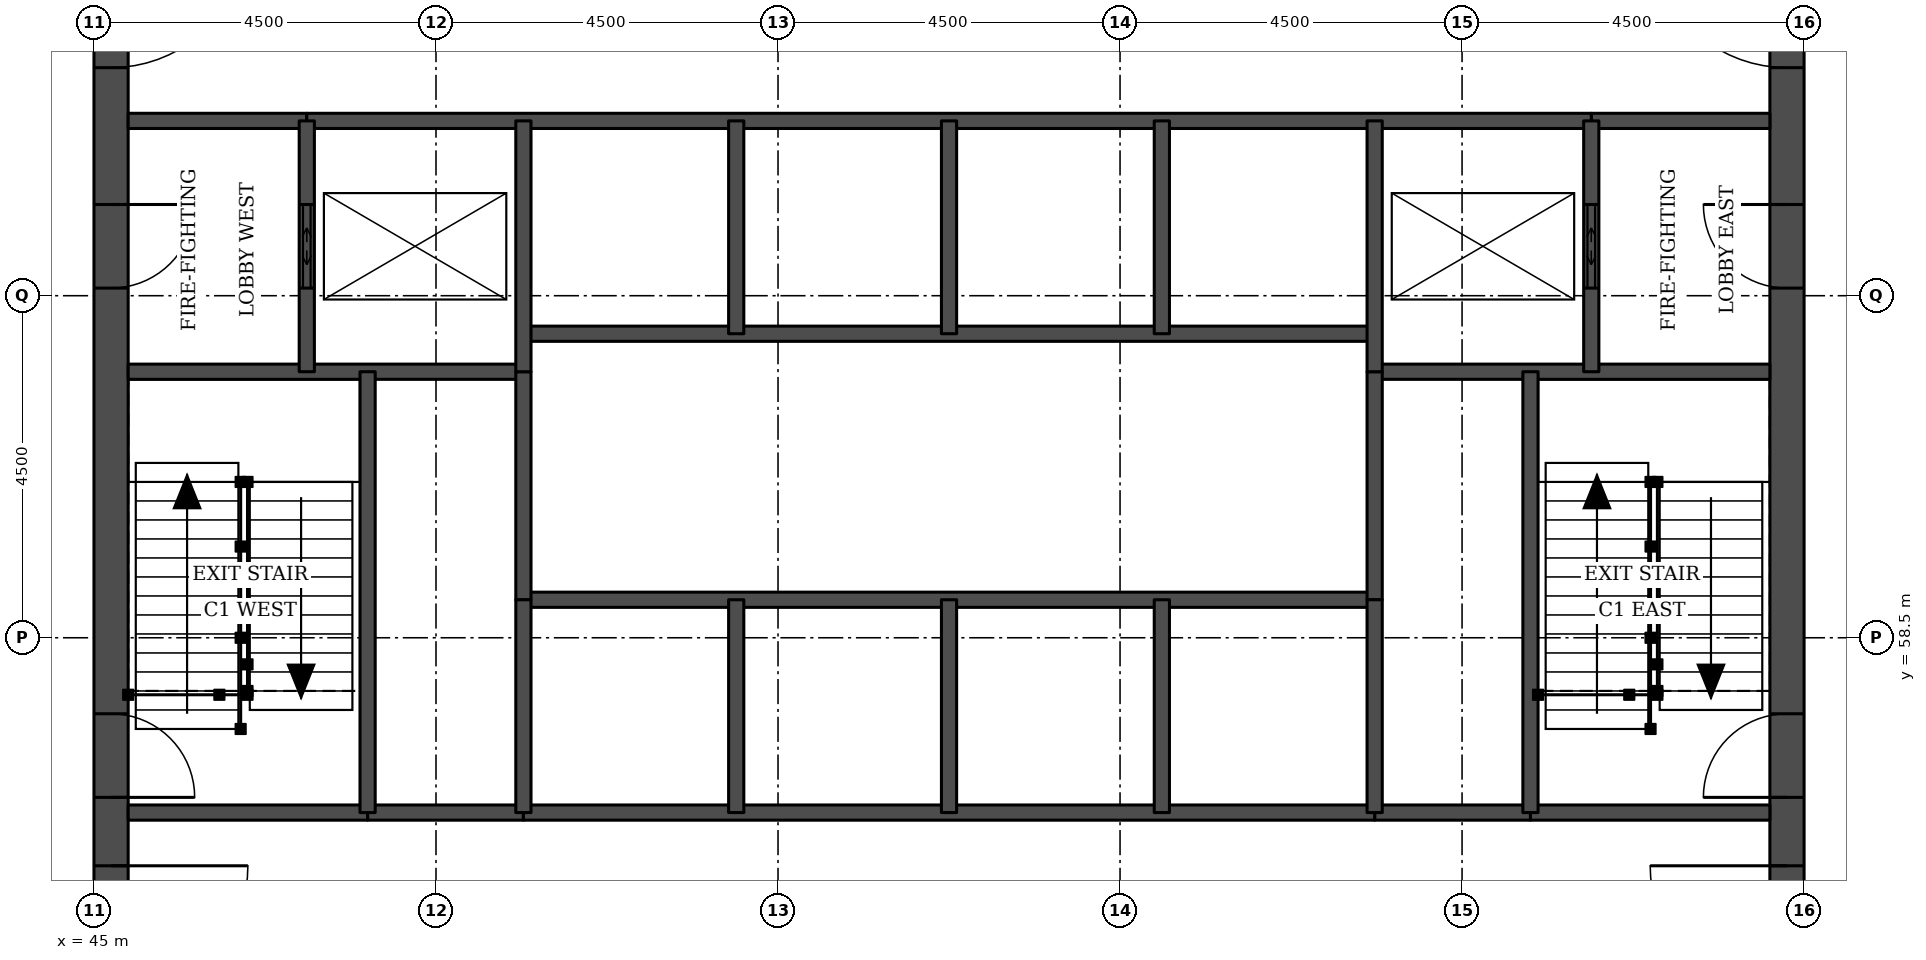
"""IFC4 building model, lengths in metres.
Left out: names, types, materials, properties, quantities, classifications, styles, units other than length and angle.
Written with IfcOpenShell. Run it as: python <this file> out.ifc"""

import sys

from ifc_helpers import new_model, si_unit, direction, frame, frame_2d, origin, place, context, subcontext, project, spatial, rectangle, extrude, element, fill, save


model = new_model("IFC4")
c1 = context("Model", 3, precision=1e-05, world=origin(), true_north=direction((0.0, 1.0)))
c2 = subcontext(c1, "Body", "Model", "MODEL_VIEW")
j1 = project(units=[si_unit("LENGTHUNIT", "METRE"), si_unit("PLANEANGLEUNIT", "RADIAN")], contexts=[c1])
p1 = place(None, origin())
s1 = spatial("IfcSite", under=j1, at=p1, CompositionType="ELEMENT")
p2 = place(p1, origin())
s2 = spatial("IfcBuilding", under=s1, at=p2, CompositionType="ELEMENT")
p3 = place(p2, frame((0.0, 0.0, 134.4)))
s3 = spatial("IfcBuildingStorey", under=s2, at=p3, CompositionType="ELEMENT", Elevation=134.4)
p4 = place(p3, frame((45.225, 49.5, 0.0), z_axis=(0.0, 0.0, 1.0), x_axis=(0.0, 1.0, 0.0)))
e1 = element("IfcWall", 1, at=p4, inside=s3, PredefinedType="SHEAR", context=c2, shape_type="SweptSolid", body=[
    extrude(rectangle(XDim=22.5, YDim=0.45, at=frame_2d((11.25, 0.0))), origin(), (0.0, 0.0, 1.0), 3.7),
])
p5 = place(p4, frame((4.2, 0.0, 0.0)))
e2 = element("IfcOpeningElement", 2, at=p5, cuts=e1, PredefinedType="OPENING", context=c2, shape_type="SweptSolid", body=[
    extrude(rectangle(XDim=1.8, YDim=2.1, at=frame_2d((0.9, 1.05))), frame((0.0, 0.235, 0.0), z_axis=(0.0, -1.0, 0.0), x_axis=(1.0, 0.0, 0.0)), (0.0, 0.0, 1.0), 0.47),
])
p6 = place(p4, frame((6.9, 0.0, 0.0)))
e3 = element("IfcOpeningElement", 3, at=p6, cuts=e1, PredefinedType="OPENING", context=c2, shape_type="SweptSolid", body=[
    extrude(rectangle(XDim=1.1, YDim=2.1, at=frame_2d((0.55, 1.05))), frame((0.0, 0.235, 0.0), z_axis=(0.0, -1.0, 0.0), x_axis=(1.0, 0.0, 0.0)), (0.0, 0.0, 1.0), 0.47),
])
p7 = place(p4, frame((13.6, 0.0, 0.0)))
e4 = element("IfcOpeningElement", 4, at=p7, cuts=e1, PredefinedType="OPENING", context=c2, shape_type="SweptSolid", body=[
    extrude(rectangle(XDim=1.1, YDim=2.1, at=frame_2d((0.55, 1.05))), frame((0.0, 0.235, 0.0), z_axis=(0.0, -1.0, 0.0), x_axis=(1.0, 0.0, 0.0)), (0.0, 0.0, 1.0), 0.47),
])
p8 = place(p4, frame((16.5, 0.0, 0.0)))
e5 = element("IfcOpeningElement", 5, at=p8, cuts=e1, PredefinedType="OPENING", context=c2, shape_type="SweptSolid", body=[
    extrude(rectangle(XDim=1.8, YDim=2.1, at=frame_2d((0.9, 1.05))), frame((0.0, 0.235, 0.0), z_axis=(0.0, -1.0, 0.0), x_axis=(1.0, 0.0, 0.0)), (0.0, 0.0, 1.0), 0.47),
])
p9 = place(p3, frame((67.275, 49.5, 0.0), z_axis=(0.0, 0.0, 1.0), x_axis=(0.0, 1.0, 0.0)))
e6 = element("IfcWall", 6, at=p9, inside=s3, PredefinedType="SHEAR", context=c2, shape_type="SweptSolid", body=[
    extrude(rectangle(XDim=22.5, YDim=0.45, at=frame_2d((11.25, 0.0))), origin(), (0.0, 0.0, 1.0), 3.7),
])
p10 = place(p9, frame((4.2, 0.0, 0.0)))
e7 = element("IfcOpeningElement", 7, at=p10, cuts=e6, PredefinedType="OPENING", context=c2, shape_type="SweptSolid", body=[
    extrude(rectangle(XDim=1.8, YDim=2.1, at=frame_2d((0.9, 1.05))), frame((0.0, 0.235, 0.0), z_axis=(0.0, -1.0, 0.0), x_axis=(1.0, 0.0, 0.0)), (0.0, 0.0, 1.0), 0.47),
])
p11 = place(p9, frame((6.9, 0.0, 0.0)))
e8 = element("IfcOpeningElement", 8, at=p11, cuts=e6, PredefinedType="OPENING", context=c2, shape_type="SweptSolid", body=[
    extrude(rectangle(XDim=1.1, YDim=2.1, at=frame_2d((0.55, 1.05))), frame((0.0, 0.235, 0.0), z_axis=(0.0, -1.0, 0.0), x_axis=(1.0, 0.0, 0.0)), (0.0, 0.0, 1.0), 0.47),
])
p12 = place(p9, frame((13.6, 0.0, 0.0)))
e9 = element("IfcOpeningElement", 9, at=p12, cuts=e6, PredefinedType="OPENING", context=c2, shape_type="SweptSolid", body=[
    extrude(rectangle(XDim=1.1, YDim=2.1, at=frame_2d((0.55, 1.05))), frame((0.0, 0.235, 0.0), z_axis=(0.0, -1.0, 0.0), x_axis=(1.0, 0.0, 0.0)), (0.0, 0.0, 1.0), 0.47),
])
p13 = place(p9, frame((16.5, 0.0, 0.0)))
e10 = element("IfcOpeningElement", 10, at=p13, cuts=e6, PredefinedType="OPENING", context=c2, shape_type="SweptSolid", body=[
    extrude(rectangle(XDim=1.8, YDim=2.1, at=frame_2d((0.9, 1.05))), frame((0.0, 0.235, 0.0), z_axis=(0.0, -1.0, 0.0), x_axis=(1.0, 0.0, 0.0)), (0.0, 0.0, 1.0), 0.47),
])
for number, where, z_axis, x_axis in (
    (11, (48.6, 56.2, 0.0), (0.0, 0.0, 1.0), (1.0, 0.0, 0.0)),
    (12, (61.85, 56.2, 0.0), (0.0, 0.0, 1.0), (1.0, 0.0, 0.0)),
):
    element("IfcWall", number, at=place(p3, frame(where, z_axis=z_axis, x_axis=x_axis)), inside=s3, PredefinedType="SOLIDWALL", context=c2, shape_type="SweptSolid", body=[
        extrude(rectangle(XDim=2.05, YDim=0.2, at=frame_2d((1.025, 0.0))), origin(), (0.0, 0.0, 1.0), 3.55),
    ])
p14 = place(p3, frame((45.45, 56.2, 0.0), z_axis=(0.0, 0.0, 1.0), x_axis=(1.0, 0.0, 0.0)))
e13 = element("IfcWall", 13, at=p14, inside=s3, PredefinedType="SOLIDWALL", context=c2, shape_type="SweptSolid", body=[
    extrude(rectangle(XDim=3.15, YDim=0.2, at=frame_2d((1.575, 0.0))), origin(), (0.0, 0.0, 1.0), 3.55),
])
p15 = place(p3, frame((50.65, 56.2, 0.0), z_axis=(0.0, 0.0, 1.0), x_axis=(1.0, 0.0, 0.0)))
e14 = element("IfcWall", 14, at=p15, inside=s3, PredefinedType="SOLIDWALL", context=c2, shape_type="SweptSolid", body=[
    extrude(rectangle(XDim=11.2, YDim=0.2, at=frame_2d((5.6, 0.0))), origin(), (0.0, 0.0, 1.0), 3.55),
])
p16 = place(p3, frame((63.9, 56.2, 0.0), z_axis=(0.0, 0.0, 1.0), x_axis=(1.0, 0.0, 0.0)))
e15 = element("IfcWall", 15, at=p16, inside=s3, PredefinedType="SOLIDWALL", context=c2, shape_type="SweptSolid", body=[
    extrude(rectangle(XDim=3.15, YDim=0.2, at=frame_2d((1.575, 0.0))), origin(), (0.0, 0.0, 1.0), 3.55),
])
p17 = place(p3, frame((50.65, 59.0, 0.0), z_axis=(0.0, 0.0, 1.0), x_axis=(1.0, 0.0, 0.0)))
e16 = element("IfcWall", 16, at=p17, inside=s3, PredefinedType="SOLIDWALL", context=c2, shape_type="SweptSolid", body=[
    extrude(rectangle(XDim=11.2, YDim=0.2, at=frame_2d((5.6, 0.0))), origin(), (0.0, 0.0, 1.0), 3.7),
])
for number, where, z_axis, x_axis in (
    (17, (45.45, 62.0, 0.0), (0.0, 0.0, 1.0), (1.0, 0.0, 0.0)),
    (18, (61.85, 62.0, 0.0), (0.0, 0.0, 1.0), (1.0, 0.0, 0.0)),
):
    element("IfcWall", number, at=place(p3, frame(where, z_axis=z_axis, x_axis=x_axis)), inside=s3, PredefinedType="SOLIDWALL", context=c2, shape_type="SweptSolid", body=[
        extrude(rectangle(XDim=5.2, YDim=0.2, at=frame_2d((2.6, 0.0))), origin(), (0.0, 0.0, 1.0), 3.55),
    ])
p18 = place(p3, frame((50.65, 62.5, 0.0), z_axis=(0.0, 0.0, 1.0), x_axis=(1.0, 0.0, 0.0)))
e19 = element("IfcWall", 19, at=p18, inside=s3, PredefinedType="SOLIDWALL", context=c2, shape_type="SweptSolid", body=[
    extrude(rectangle(XDim=11.2, YDim=0.2, at=frame_2d((5.6, 0.0))), origin(), (0.0, 0.0, 1.0), 3.7),
])
for number, where, z_axis, x_axis in (
    (20, (45.45, 65.3, 0.0), (0.0, 0.0, 1.0), (1.0, 0.0, 0.0)),
    (21, (64.7, 65.3, 0.0), (0.0, 0.0, 1.0), (1.0, 0.0, 0.0)),
):
    element("IfcWall", number, at=place(p3, frame(where, z_axis=z_axis, x_axis=x_axis)), inside=s3, PredefinedType="SOLIDWALL", context=c2, shape_type="SweptSolid", body=[
        extrude(rectangle(XDim=2.35, YDim=0.2, at=frame_2d((1.175, 0.0))), origin(), (0.0, 0.0, 1.0), 3.55),
    ])
p19 = place(p3, frame((47.8, 65.3, 0.0), z_axis=(0.0, 0.0, 1.0), x_axis=(1.0, 0.0, 0.0)))
e22 = element("IfcWall", 22, at=p19, inside=s3, PredefinedType="SOLIDWALL", context=c2, shape_type="SweptSolid", body=[
    extrude(rectangle(XDim=16.9, YDim=0.2, at=frame_2d((8.45, 0.0))), origin(), (0.0, 0.0, 1.0), 3.55),
])
p20 = place(p3, frame((47.8, 62.0, 0.0), z_axis=(0.0, 0.0, 1.0), x_axis=(0.0, 1.0, 0.0)))
e23 = element("IfcWall", 23, at=p20, inside=s3, PredefinedType="SOLIDWALL", context=c2, shape_type="SweptSolid", body=[
    extrude(rectangle(XDim=3.3, YDim=0.2, at=frame_2d((1.65, 0.0))), origin(), (0.0, 0.0, 1.0), 3.55),
])
p21 = place(p20, frame((1.1, 0.0, 0.0)))
e24 = element("IfcOpeningElement", 24, at=p21, cuts=e23, PredefinedType="OPENING", context=c2, shape_type="SweptSolid", body=[
    extrude(rectangle(XDim=1.1, YDim=2.1, at=frame_2d((0.55, 1.05))), frame((0.0, 0.11, 0.0), z_axis=(0.0, -1.0, 0.0), x_axis=(1.0, 0.0, 0.0)), (0.0, 0.0, 1.0), 0.22),
])
p22 = place(p3, frame((48.6, 56.2, 0.0), z_axis=(0.0, 0.0, 1.0), x_axis=(0.0, 1.0, 0.0)))
e25 = element("IfcWall", 25, at=p22, inside=s3, PredefinedType="SOLIDWALL", context=c2, shape_type="SweptSolid", body=[
    extrude(rectangle(XDim=5.8, YDim=0.2, at=frame_2d((2.9, 0.0))), origin(), (0.0, 0.0, 1.0), 3.55),
])
p23 = place(p3, frame((50.65, 59.0, 0.0), z_axis=(0.0, 0.0, 1.0), x_axis=(0.0, 1.0, 0.0)))
e26 = element("IfcWall", 26, at=p23, inside=s3, PredefinedType="SOLIDWALL", context=c2, shape_type="SweptSolid", body=[
    extrude(rectangle(XDim=3.0, YDim=0.2, at=frame_2d((1.5, 0.0))), origin(), (0.0, 0.0, 1.0), 3.7),
])
p24 = place(p3, frame((50.65, 56.2, 0.0), z_axis=(0.0, 0.0, 1.0), x_axis=(0.0, 1.0, 0.0)))
e27 = element("IfcWall", 27, at=p24, inside=s3, PredefinedType="SOLIDWALL", context=c2, shape_type="SweptSolid", body=[
    extrude(rectangle(XDim=2.8, YDim=0.2, at=frame_2d((1.4, 0.0))), origin(), (0.0, 0.0, 1.0), 3.55),
])
p25 = place(p3, frame((50.65, 62.0, 0.0), z_axis=(0.0, 0.0, 1.0), x_axis=(0.0, 1.0, 0.0)))
e28 = element("IfcWall", 28, at=p25, inside=s3, PredefinedType="SOLIDWALL", context=c2, shape_type="SweptSolid", body=[
    extrude(rectangle(XDim=3.3, YDim=0.2, at=frame_2d((1.65, 0.0))), origin(), (0.0, 0.0, 1.0), 3.55),
])
for number, where, z_axis, x_axis in (
    (29, (53.45, 56.2, 0.0), (0.0, 0.0, 1.0), (0.0, 1.0, 0.0)),
    (30, (53.45, 62.5, 0.0), (0.0, 0.0, 1.0), (0.0, 1.0, 0.0)),
    (31, (56.25, 56.2, 0.0), (0.0, 0.0, 1.0), (0.0, 1.0, 0.0)),
    (32, (56.25, 62.5, 0.0), (0.0, 0.0, 1.0), (0.0, 1.0, 0.0)),
    (33, (59.05, 56.2, 0.0), (0.0, 0.0, 1.0), (0.0, 1.0, 0.0)),
    (34, (59.05, 62.5, 0.0), (0.0, 0.0, 1.0), (0.0, 1.0, 0.0)),
):
    element("IfcWall", number, at=place(p3, frame(where, z_axis=z_axis, x_axis=x_axis)), inside=s3, PredefinedType="SOLIDWALL", context=c2, shape_type="SweptSolid", body=[
        extrude(rectangle(XDim=2.8, YDim=0.2, at=frame_2d((1.4, 0.0))), origin(), (0.0, 0.0, 1.0), 3.55),
    ])
p26 = place(p3, frame((61.85, 59.0, 0.0), z_axis=(0.0, 0.0, 1.0), x_axis=(0.0, 1.0, 0.0)))
e35 = element("IfcWall", 35, at=p26, inside=s3, PredefinedType="SOLIDWALL", context=c2, shape_type="SweptSolid", body=[
    extrude(rectangle(XDim=3.0, YDim=0.2, at=frame_2d((1.5, 0.0))), origin(), (0.0, 0.0, 1.0), 3.7),
])
p27 = place(p3, frame((61.85, 56.2, 0.0), z_axis=(0.0, 0.0, 1.0), x_axis=(0.0, 1.0, 0.0)))
e36 = element("IfcWall", 36, at=p27, inside=s3, PredefinedType="SOLIDWALL", context=c2, shape_type="SweptSolid", body=[
    extrude(rectangle(XDim=2.8, YDim=0.2, at=frame_2d((1.4, 0.0))), origin(), (0.0, 0.0, 1.0), 3.55),
])
p28 = place(p3, frame((61.85, 62.0, 0.0), z_axis=(0.0, 0.0, 1.0), x_axis=(0.0, 1.0, 0.0)))
e37 = element("IfcWall", 37, at=p28, inside=s3, PredefinedType="SOLIDWALL", context=c2, shape_type="SweptSolid", body=[
    extrude(rectangle(XDim=3.3, YDim=0.2, at=frame_2d((1.65, 0.0))), origin(), (0.0, 0.0, 1.0), 3.55),
])
p29 = place(p3, frame((63.9, 56.2, 0.0), z_axis=(0.0, 0.0, 1.0), x_axis=(0.0, 1.0, 0.0)))
e38 = element("IfcWall", 38, at=p29, inside=s3, PredefinedType="SOLIDWALL", context=c2, shape_type="SweptSolid", body=[
    extrude(rectangle(XDim=5.8, YDim=0.2, at=frame_2d((2.9, 0.0))), origin(), (0.0, 0.0, 1.0), 3.55),
])
p30 = place(p3, frame((64.7, 62.0, 0.0), z_axis=(0.0, 0.0, 1.0), x_axis=(0.0, 1.0, 0.0)))
e39 = element("IfcWall", 39, at=p30, inside=s3, PredefinedType="SOLIDWALL", context=c2, shape_type="SweptSolid", body=[
    extrude(rectangle(XDim=3.3, YDim=0.2, at=frame_2d((1.65, 0.0))), origin(), (0.0, 0.0, 1.0), 3.55),
])
p31 = place(p30, frame((1.1, 0.0, 0.0)))
e40 = element("IfcOpeningElement", 40, at=p31, cuts=e39, PredefinedType="OPENING", context=c2, shape_type="SweptSolid", body=[
    extrude(rectangle(XDim=1.1, YDim=2.1, at=frame_2d((0.55, 1.05))), frame((0.0, 0.11, 0.0), z_axis=(0.0, -1.0, 0.0), x_axis=(1.0, 0.0, 0.0)), (0.0, 0.0, 1.0), 0.22),
])
p32 = place(p21, origin())
e41 = element("IfcDoor", 41, at=p32, inside=s3, OperationType="DOUBLE_DOOR_SLIDING", PredefinedType="DOOR", context=c2, shape_type="SweptSolid", body=[
    extrude(rectangle(XDim=1.1, YDim=2.1, at=frame_2d((0.55, 1.05))), frame((0.0, 0.025, 0.0), z_axis=(0.0, -1.0, 0.0), x_axis=(1.0, 0.0, 0.0)), (0.0, 0.0, 1.0), 0.05),
])
fill(e24, e41)
p33 = place(p31, origin())
e42 = element("IfcDoor", 42, at=p33, inside=s3, OperationType="DOUBLE_DOOR_SLIDING", PredefinedType="DOOR", context=c2, shape_type="SweptSolid", body=[
    extrude(rectangle(XDim=1.1, YDim=2.1, at=frame_2d((0.55, 1.05))), frame((0.0, 0.025, 0.0), z_axis=(0.0, -1.0, 0.0), x_axis=(1.0, 0.0, 0.0)), (0.0, 0.0, 1.0), 0.05),
])
fill(e40, e42)
p34 = place(p5, frame((1.8, 0.0, 0.0), z_axis=(0.0, 0.0, 1.0), x_axis=(-1.0, 0.0, 0.0)))
e43 = element("IfcDoor", 43, at=p34, inside=s3, OperationType="SINGLE_SWING_LEFT", PredefinedType="DOOR", context=c2, shape_type="SweptSolid", body=[
    extrude(rectangle(XDim=1.8, YDim=2.1, at=frame_2d((0.9, 1.05))), frame((0.0, 0.025, 0.0), z_axis=(0.0, -1.0, 0.0), x_axis=(1.0, 0.0, 0.0)), (0.0, 0.0, 1.0), 0.05),
])
fill(e2, e43)
p35 = place(p6, frame((1.1, 0.0, 0.0), z_axis=(0.0, 0.0, 1.0), x_axis=(-1.0, 0.0, 0.0)))
e44 = element("IfcDoor", 44, at=p35, inside=s3, OperationType="SINGLE_SWING_RIGHT", PredefinedType="DOOR", context=c2, shape_type="SweptSolid", body=[
    extrude(rectangle(XDim=1.1, YDim=2.1, at=frame_2d((0.55, 1.05))), frame((0.0, 0.025, 0.0), z_axis=(0.0, -1.0, 0.0), x_axis=(1.0, 0.0, 0.0)), (0.0, 0.0, 1.0), 0.05),
])
fill(e3, e44)
p36 = place(p7, frame((1.1, 0.0, 0.0), z_axis=(0.0, 0.0, 1.0), x_axis=(-1.0, 0.0, 0.0)))
e45 = element("IfcDoor", 45, at=p36, inside=s3, OperationType="SINGLE_SWING_LEFT", PredefinedType="DOOR", context=c2, shape_type="SweptSolid", body=[
    extrude(rectangle(XDim=1.1, YDim=2.1, at=frame_2d((0.55, 1.05))), frame((0.0, 0.025, 0.0), z_axis=(0.0, -1.0, 0.0), x_axis=(1.0, 0.0, 0.0)), (0.0, 0.0, 1.0), 0.05),
])
fill(e4, e45)
p37 = place(p8, frame((1.8, 0.0, 0.0), z_axis=(0.0, 0.0, 1.0), x_axis=(-1.0, 0.0, 0.0)))
e46 = element("IfcDoor", 46, at=p37, inside=s3, OperationType="SINGLE_SWING_LEFT", PredefinedType="DOOR", context=c2, shape_type="SweptSolid", body=[
    extrude(rectangle(XDim=1.8, YDim=2.1, at=frame_2d((0.9, 1.05))), frame((0.0, 0.025, 0.0), z_axis=(0.0, -1.0, 0.0), x_axis=(1.0, 0.0, 0.0)), (0.0, 0.0, 1.0), 0.05),
])
fill(e5, e46)
p38 = place(p10, origin())
e47 = element("IfcDoor", 47, at=p38, inside=s3, OperationType="SINGLE_SWING_RIGHT", PredefinedType="DOOR", context=c2, shape_type="SweptSolid", body=[
    extrude(rectangle(XDim=1.8, YDim=2.1, at=frame_2d((0.9, 1.05))), frame((0.0, 0.025, 0.0), z_axis=(0.0, -1.0, 0.0), x_axis=(1.0, 0.0, 0.0)), (0.0, 0.0, 1.0), 0.05),
])
fill(e7, e47)
p39 = place(p11, origin())
e48 = element("IfcDoor", 48, at=p39, inside=s3, OperationType="SINGLE_SWING_LEFT", PredefinedType="DOOR", context=c2, shape_type="SweptSolid", body=[
    extrude(rectangle(XDim=1.1, YDim=2.1, at=frame_2d((0.55, 1.05))), frame((0.0, 0.025, 0.0), z_axis=(0.0, -1.0, 0.0), x_axis=(1.0, 0.0, 0.0)), (0.0, 0.0, 1.0), 0.05),
])
fill(e8, e48)
p40 = place(p12, origin())
e49 = element("IfcDoor", 49, at=p40, inside=s3, OperationType="SINGLE_SWING_RIGHT", PredefinedType="DOOR", context=c2, shape_type="SweptSolid", body=[
    extrude(rectangle(XDim=1.1, YDim=2.1, at=frame_2d((0.55, 1.05))), frame((0.0, 0.025, 0.0), z_axis=(0.0, -1.0, 0.0), x_axis=(1.0, 0.0, 0.0)), (0.0, 0.0, 1.0), 0.05),
])
fill(e9, e49)
p41 = place(p13, origin())
e50 = element("IfcDoor", 50, at=p41, inside=s3, OperationType="SINGLE_SWING_RIGHT", PredefinedType="DOOR", context=c2, shape_type="SweptSolid", body=[
    extrude(rectangle(XDim=1.8, YDim=2.1, at=frame_2d((0.9, 1.05))), frame((0.0, 0.025, 0.0), z_axis=(0.0, -1.0, 0.0), x_axis=(1.0, 0.0, 0.0)), (0.0, 0.0, 1.0), 0.05),
])
fill(e10, e50)
save(model, sys.argv[1])
